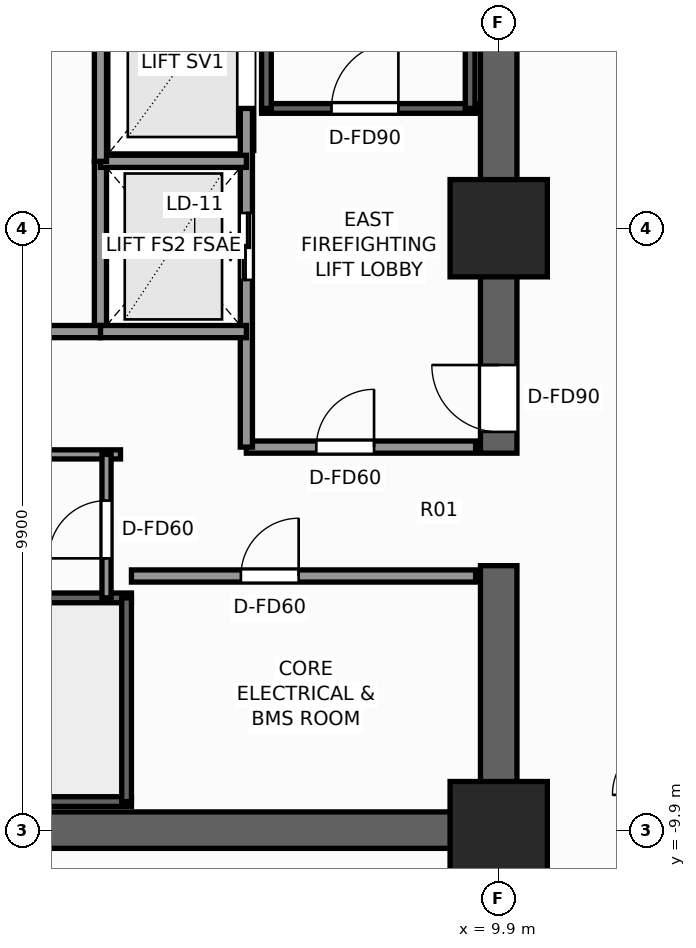
"""IFC4 building model, lengths in metres.
Left out: names, types, materials, properties, quantities, classifications, styles, units other than length and angle.
Written with IfcOpenShell. Run it as: python <this file> out.ifc"""

import sys

from ifc_helpers import new_model, si_unit, direction, frame, frame_2d, origin, origin_2d, place, context, subcontext, project, spatial, rectangle, extrude, element, fill, save


model = new_model("IFC4")
c1 = context("Model", 3, precision=1e-05, world=origin(), true_north=direction((0.0, 1.0)))
c2 = subcontext(c1, "Body", "Model", "MODEL_VIEW")
j1 = project(units=[si_unit("LENGTHUNIT", "METRE"), si_unit("PLANEANGLEUNIT", "RADIAN")], contexts=[c1])
p1 = place(None, origin())
s1 = spatial("IfcSite", under=j1, at=p1, CompositionType="ELEMENT")
p2 = place(p1, origin())
s2 = spatial("IfcBuilding", under=s1, at=p2, CompositionType="ELEMENT")
p3 = place(p2, frame((0.0, 0.0, 15.2)))
s3 = spatial("IfcBuildingStorey", under=s2, at=p3, CompositionType="ELEMENT", Elevation=15.2)
p4 = place(p3, frame((10.2, -9.9, 0.0), z_axis=(0.0, 0.0, 1.0), x_axis=(-1.0, 0.0, 0.0)))
e1 = element("IfcWall", 1, at=p4, inside=s3, PredefinedType="SHEAR", context=c2, shape_type="SweptSolid", body=[
    extrude(rectangle(XDim=12.06, YDim=0.6, at=frame_2d((6.03, 0.0))), origin(), (0.0, 0.0, 1.0), 4.1),
])
p5 = place(p3, frame((9.9, -9.6, 0.0), z_axis=(0.0, 0.0, 1.0), x_axis=(0.0, 1.0, 0.0)))
e2 = element("IfcWall", 2, at=p5, inside=s3, PredefinedType="SHEAR", context=c2, shape_type="SweptSolid", body=[
    extrude(rectangle(XDim=4.05, YDim=0.6, at=frame_2d((2.025, 0.0))), origin(), (0.0, 0.0, 1.0), 4.1),
])
p6 = place(p3, frame((9.9, -3.7, 0.0), z_axis=(0.0, 0.0, 1.0), x_axis=(0.0, 1.0, 0.0)))
e3 = element("IfcWall", 3, at=p6, inside=s3, PredefinedType="SHEAR", context=c2, shape_type="SweptSolid", body=[
    extrude(rectangle(XDim=13.3, YDim=0.6, at=frame_2d((6.65, 0.0))), origin(), (0.0, 0.0, 1.0), 4.1),
])
p7 = place(p6, frame((0.35, 0.0, 0.0)))
e4 = element("IfcOpeningElement", 4, at=p7, cuts=e3, PredefinedType="OPENING", context=c2, shape_type="SweptSolid", body=[
    extrude(rectangle(XDim=1.1, YDim=2.2, at=frame_2d((0.55, 1.1))), frame((0.0, 0.31, 0.0), z_axis=(0.0, -1.0, 0.0), x_axis=(1.0, 0.0, 0.0)), (0.0, 0.0, 1.0), 0.62),
])
for number, where, z_axis, x_axis in (
    (5, (9.9, -9.9, 0.0), (0.0, 0.0, 1.0), (1.0, 0.0, 0.0)),
    (6, (9.9, 0.0, 0.0), (0.0, 0.0, 1.0), (1.0, 0.0, 0.0)),
):
    element("IfcColumn", number, at=place(p3, frame(where, z_axis=z_axis, x_axis=x_axis)), inside=s3, PredefinedType="COLUMN", context=c2, shape_type="SweptSolid", body=[
        extrude(rectangle(XDim=1.6, YDim=1.6, at=origin_2d()), origin(), (0.0, 0.0, 1.0), 4.1),
    ])
p8 = place(p3, frame((6.0, 1.97, 0.0), z_axis=(0.0, 0.0, 1.0), x_axis=(1.0, 0.0, 0.0)))
e7 = element("IfcWall", 7, at=p8, inside=s3, PredefinedType="SHEAR", context=c2, shape_type="SweptSolid", body=[
    extrude(rectangle(XDim=3.52, YDim=0.16, at=frame_2d((1.76, 0.0))), origin(), (0.0, 0.0, 1.0), 4.1),
])
p9 = place(p8, frame((1.15, 0.0, 0.0)))
e8 = element("IfcOpeningElement", 8, at=p9, cuts=e7, PredefinedType="OPENING", context=c2, shape_type="SweptSolid", body=[
    extrude(rectangle(XDim=1.1, YDim=2.2, at=frame_2d((0.55, 1.1))), frame((0.0, 0.09, 0.0), z_axis=(0.0, -1.0, 0.0), x_axis=(1.0, 0.0, 0.0)), (0.0, 0.0, 1.0), 0.18),
])
for number, where, z_axis, x_axis in (
    (9, (6.08, 1.97, 0.0), (0.0, 0.0, 1.0), (0.0, 1.0, 0.0)),
    (10, (9.43, 1.97, 0.0), (0.0, 0.0, 1.0), (0.0, 1.0, 0.0)),
):
    element("IfcWall", number, at=place(p3, frame(where, z_axis=z_axis, x_axis=x_axis)), inside=s3, PredefinedType="SHEAR", context=c2, shape_type="SweptSolid", body=[
        extrude(rectangle(XDim=7.56, YDim=0.16, at=frame_2d((3.78, 0.0))), origin(), (0.0, 0.0, 1.0), 4.1),
    ])
p10 = place(p3, frame((3.86, -9.43, 0.0), z_axis=(0.0, 0.0, 1.0), x_axis=(-1.0, 0.0, 0.0)))
e11 = element("IfcWall", 11, at=p10, inside=s3, PredefinedType="SHEAR", context=c2, shape_type="SweptSolid", body=[
    extrude(rectangle(XDim=7.72, YDim=0.16, at=frame_2d((3.86, 0.0))), origin(), (0.0, 0.0, 1.0), 4.1),
])
p11 = place(p10, frame((6.01, 0.0, 0.0)))
e12 = element("IfcOpeningElement", 12, at=p11, cuts=e11, PredefinedType="OPENING", context=c2, shape_type="SweptSolid", body=[
    extrude(rectangle(XDim=1.1, YDim=2.2, at=frame_2d((0.55, 1.1))), frame((0.0, 0.09, 0.0), z_axis=(0.0, -1.0, 0.0), x_axis=(1.0, 0.0, 0.0)), (0.0, 0.0, 1.0), 0.18),
])
p12 = place(p3, frame((-3.86, -6.08, 0.0), z_axis=(0.0, 0.0, 1.0), x_axis=(1.0, 0.0, 0.0)))
e13 = element("IfcWall", 13, at=p12, inside=s3, PredefinedType="SHEAR", context=c2, shape_type="SweptSolid", body=[
    extrude(rectangle(XDim=7.72, YDim=0.16, at=frame_2d((3.86, 0.0))), origin(), (0.0, 0.0, 1.0), 4.1),
])
p13 = place(p3, frame((3.78, -9.43, 0.0), z_axis=(0.0, 0.0, 1.0), x_axis=(0.0, 1.0, 0.0)))
e14 = element("IfcWall", 14, at=p13, inside=s3, PredefinedType="SHEAR", context=c2, shape_type="SweptSolid", body=[
    extrude(rectangle(XDim=3.35, YDim=0.16, at=frame_2d((1.675, 0.0))), origin(), (0.0, 0.0, 1.0), 4.1),
])
p14 = place(p3, frame((5.75, -3.6, 0.0), z_axis=(0.0, 0.0, 1.0), x_axis=(1.0, 0.0, 0.0)))
e15 = element("IfcWall", 15, at=p14, inside=s3, PredefinedType="SOLIDWALL", context=c2, shape_type="SweptSolid", body=[
    extrude(rectangle(XDim=3.77, YDim=0.2, at=frame_2d((1.885, 0.0))), origin(), (0.0, 0.0, 1.0), 3.7),
])
p15 = place(p14, frame((1.15, 0.0, 0.0)))
e16 = element("IfcOpeningElement", 16, at=p15, cuts=e15, PredefinedType="OPENING", context=c2, shape_type="SweptSolid", body=[
    extrude(rectangle(XDim=0.95, YDim=2.06, at=frame_2d((0.475, 1.03))), frame((0.0, 0.11, 0.0), z_axis=(0.0, -1.0, 0.0), x_axis=(1.0, 0.0, 0.0)), (0.0, 0.0, 1.0), 0.22),
])
p16 = place(p3, frame((5.75, -3.6, 0.0), z_axis=(0.0, 0.0, 1.0), x_axis=(0.0, 1.0, 0.0)))
e17 = element("IfcWall", 17, at=p16, inside=s3, PredefinedType="SOLIDWALL", context=c2, shape_type="SweptSolid", body=[
    extrude(rectangle(XDim=5.57, YDim=0.2, at=frame_2d((2.785, 0.0))), origin(), (0.0, 0.0, 1.0), 3.7),
])
p17 = place(p16, frame((2.75, 0.0, 0.0)))
e18 = element("IfcOpeningElement", 18, at=p17, cuts=e17, PredefinedType="OPENING", context=c2, shape_type="SweptSolid", body=[
    extrude(rectangle(XDim=1.1, YDim=2.2, at=frame_2d((0.55, 1.1))), frame((0.0, 0.11, 0.0), z_axis=(0.0, -1.0, 0.0), x_axis=(1.0, 0.0, 0.0)), (0.0, 0.0, 1.0), 0.22),
])
p18 = place(p3, frame((3.35, -1.7, 0.0), z_axis=(0.0, 0.0, 1.0), x_axis=(0.0, 1.0, 0.0)))
e19 = element("IfcWall", 19, at=p18, inside=s3, PredefinedType="SOLIDWALL", context=c2, shape_type="SweptSolid", body=[
    extrude(rectangle(XDim=2.8, YDim=0.2, at=frame_2d((1.4, 0.0))), origin(), (0.0, 0.0, 1.0), 3.7),
])
for number, where, z_axis, x_axis in (
    (20, (3.35, -1.7, 0.0), (0.0, 0.0, 1.0), (1.0, 0.0, 0.0)),
    (21, (3.35, 1.1, 0.0), (0.0, 0.0, 1.0), (1.0, 0.0, 0.0)),
):
    element("IfcWall", number, at=place(p3, frame(where, z_axis=z_axis, x_axis=x_axis)), inside=s3, PredefinedType="SOLIDWALL", context=c2, shape_type="SweptSolid", body=[
        extrude(rectangle(XDim=2.4, YDim=0.2, at=frame_2d((1.2, 0.0))), origin(), (0.0, 0.0, 1.0), 3.7),
    ])
p19 = place(p3, frame((3.86, -5.72, 0.0), z_axis=(0.0, 0.0, 1.0), x_axis=(1.0, 0.0, 0.0)))
e22 = element("IfcWall", 22, at=p19, inside=s3, PredefinedType="SOLIDWALL", context=c2, shape_type="SweptSolid", body=[
    extrude(rectangle(XDim=5.66, YDim=0.2, at=frame_2d((2.83, 0.0))), origin(), (0.0, 0.0, 1.0), 3.7),
])
p20 = place(p19, frame((1.8, 0.0, 0.0)))
e23 = element("IfcOpeningElement", 23, at=p20, cuts=e22, PredefinedType="OPENING", context=c2, shape_type="SweptSolid", body=[
    extrude(rectangle(XDim=0.95, YDim=2.06, at=frame_2d((0.475, 1.03))), frame((0.0, 0.11, 0.0), z_axis=(0.0, -1.0, 0.0), x_axis=(1.0, 0.0, 0.0)), (0.0, 0.0, 1.0), 0.22),
])
p21 = place(p3, frame((-3.35, -1.7, 0.0), z_axis=(0.0, 0.0, 1.0), x_axis=(1.0, 0.0, 0.0)))
e24 = element("IfcWall", 24, at=p21, inside=s3, PredefinedType="SOLIDWALL", context=c2, shape_type="SweptSolid", body=[
    extrude(rectangle(XDim=6.7, YDim=0.2, at=frame_2d((3.35, 0.0))), origin(), (0.0, 0.0, 1.0), 3.7),
])
p22 = place(p3, frame((3.35, 1.1, 0.0), z_axis=(0.0, 0.0, 1.0), x_axis=(0.0, 1.0, 0.0)))
e25 = element("IfcWall", 25, at=p22, inside=s3, PredefinedType="SOLIDWALL", context=c2, shape_type="SweptSolid", body=[
    extrude(rectangle(XDim=3.2, YDim=0.2, at=frame_2d((1.6, 0.0))), origin(), (0.0, 0.0, 1.0), 3.7),
])
p23 = place(p3, frame((-3.68, -3.72, 0.0), z_axis=(0.0, 0.0, 1.0), x_axis=(1.0, 0.0, 0.0)))
e26 = element("IfcWall", 26, at=p23, inside=s3, PredefinedType="PARTITIONING", context=c2, shape_type="SweptSolid", body=[
    extrude(rectangle(XDim=7.36, YDim=0.15, at=frame_2d((3.68, 0.0))), origin(), (0.0, 0.0, 1.0), 3.7),
])
p24 = place(p3, frame((3.45, -6.08, 0.0), z_axis=(0.0, 0.0, 1.0), x_axis=(0.0, 1.0, 0.0)))
e27 = element("IfcWall", 27, at=p24, inside=s3, PredefinedType="PARTITIONING", context=c2, shape_type="SweptSolid", body=[
    extrude(rectangle(XDim=2.36, YDim=0.15, at=frame_2d((1.18, 0.0))), origin(), (0.0, 0.0, 1.0), 3.7),
])
p25 = place(p24, frame((0.65, 0.0, 0.0)))
e28 = element("IfcOpeningElement", 28, at=p25, cuts=e27, PredefinedType="OPENING", context=c2, shape_type="SweptSolid", body=[
    extrude(rectangle(XDim=0.95, YDim=2.06, at=frame_2d((0.475, 1.03))), frame((0.0, 0.085, 0.0), z_axis=(0.0, -1.0, 0.0), x_axis=(1.0, 0.0, 0.0)), (0.0, 0.0, 1.0), 0.17),
])
p26 = place(p9, origin())
e29 = element("IfcDoor", 29, at=p26, inside=s3, OperationType="SINGLE_SWING_RIGHT", PredefinedType="DOOR", context=c2, shape_type="SweptSolid", body=[
    extrude(rectangle(XDim=1.1, YDim=2.2, at=frame_2d((0.55, 1.1))), frame((0.0, 0.025, 0.0), z_axis=(0.0, -1.0, 0.0), x_axis=(1.0, 0.0, 0.0)), (0.0, 0.0, 1.0), 0.05),
])
fill(e8, e29)
p27 = place(p7, origin())
e30 = element("IfcDoor", 30, at=p27, inside=s3, OperationType="SINGLE_SWING_RIGHT", PredefinedType="DOOR", context=c2, shape_type="SweptSolid", body=[
    extrude(rectangle(XDim=1.1, YDim=2.2, at=frame_2d((0.55, 1.1))), frame((0.0, 0.025, 0.0), z_axis=(0.0, -1.0, 0.0), x_axis=(1.0, 0.0, 0.0)), (0.0, 0.0, 1.0), 0.05),
])
fill(e4, e30)
p28 = place(p17, origin())
e31 = element("IfcDoor", 31, at=p28, inside=s3, OperationType="DOUBLE_DOOR_SLIDING", PredefinedType="DOOR", context=c2, shape_type="SweptSolid", body=[
    extrude(rectangle(XDim=1.1, YDim=2.2, at=frame_2d((0.55, 1.1))), frame((0.0, 0.025, 0.0), z_axis=(0.0, -1.0, 0.0), x_axis=(1.0, 0.0, 0.0)), (0.0, 0.0, 1.0), 0.05),
])
fill(e18, e31)
p29 = place(p20, origin())
e32 = element("IfcDoor", 32, at=p29, inside=s3, OperationType="SINGLE_SWING_RIGHT", PredefinedType="DOOR", context=c2, shape_type="SweptSolid", body=[
    extrude(rectangle(XDim=0.95, YDim=2.06, at=frame_2d((0.475, 1.03))), frame((0.0, 0.025, 0.0), z_axis=(0.0, -1.0, 0.0), x_axis=(1.0, 0.0, 0.0)), (0.0, 0.0, 1.0), 0.05),
])
fill(e23, e32)
p30 = place(p15, origin())
e33 = element("IfcDoor", 33, at=p30, inside=s3, OperationType="SINGLE_SWING_RIGHT", PredefinedType="DOOR", context=c2, shape_type="SweptSolid", body=[
    extrude(rectangle(XDim=0.95, YDim=2.06, at=frame_2d((0.475, 1.03))), frame((0.0, 0.025, 0.0), z_axis=(0.0, -1.0, 0.0), x_axis=(1.0, 0.0, 0.0)), (0.0, 0.0, 1.0), 0.05),
])
fill(e16, e33)
p31 = place(p25, origin())
e34 = element("IfcDoor", 34, at=p31, inside=s3, OperationType="SINGLE_SWING_LEFT", PredefinedType="DOOR", context=c2, shape_type="SweptSolid", body=[
    extrude(rectangle(XDim=0.95, YDim=2.06, at=frame_2d((0.475, 1.03))), frame((0.0, 0.025, 0.0), z_axis=(0.0, -1.0, 0.0), x_axis=(1.0, 0.0, 0.0)), (0.0, 0.0, 1.0), 0.05),
])
fill(e28, e34)
save(model, sys.argv[1])
